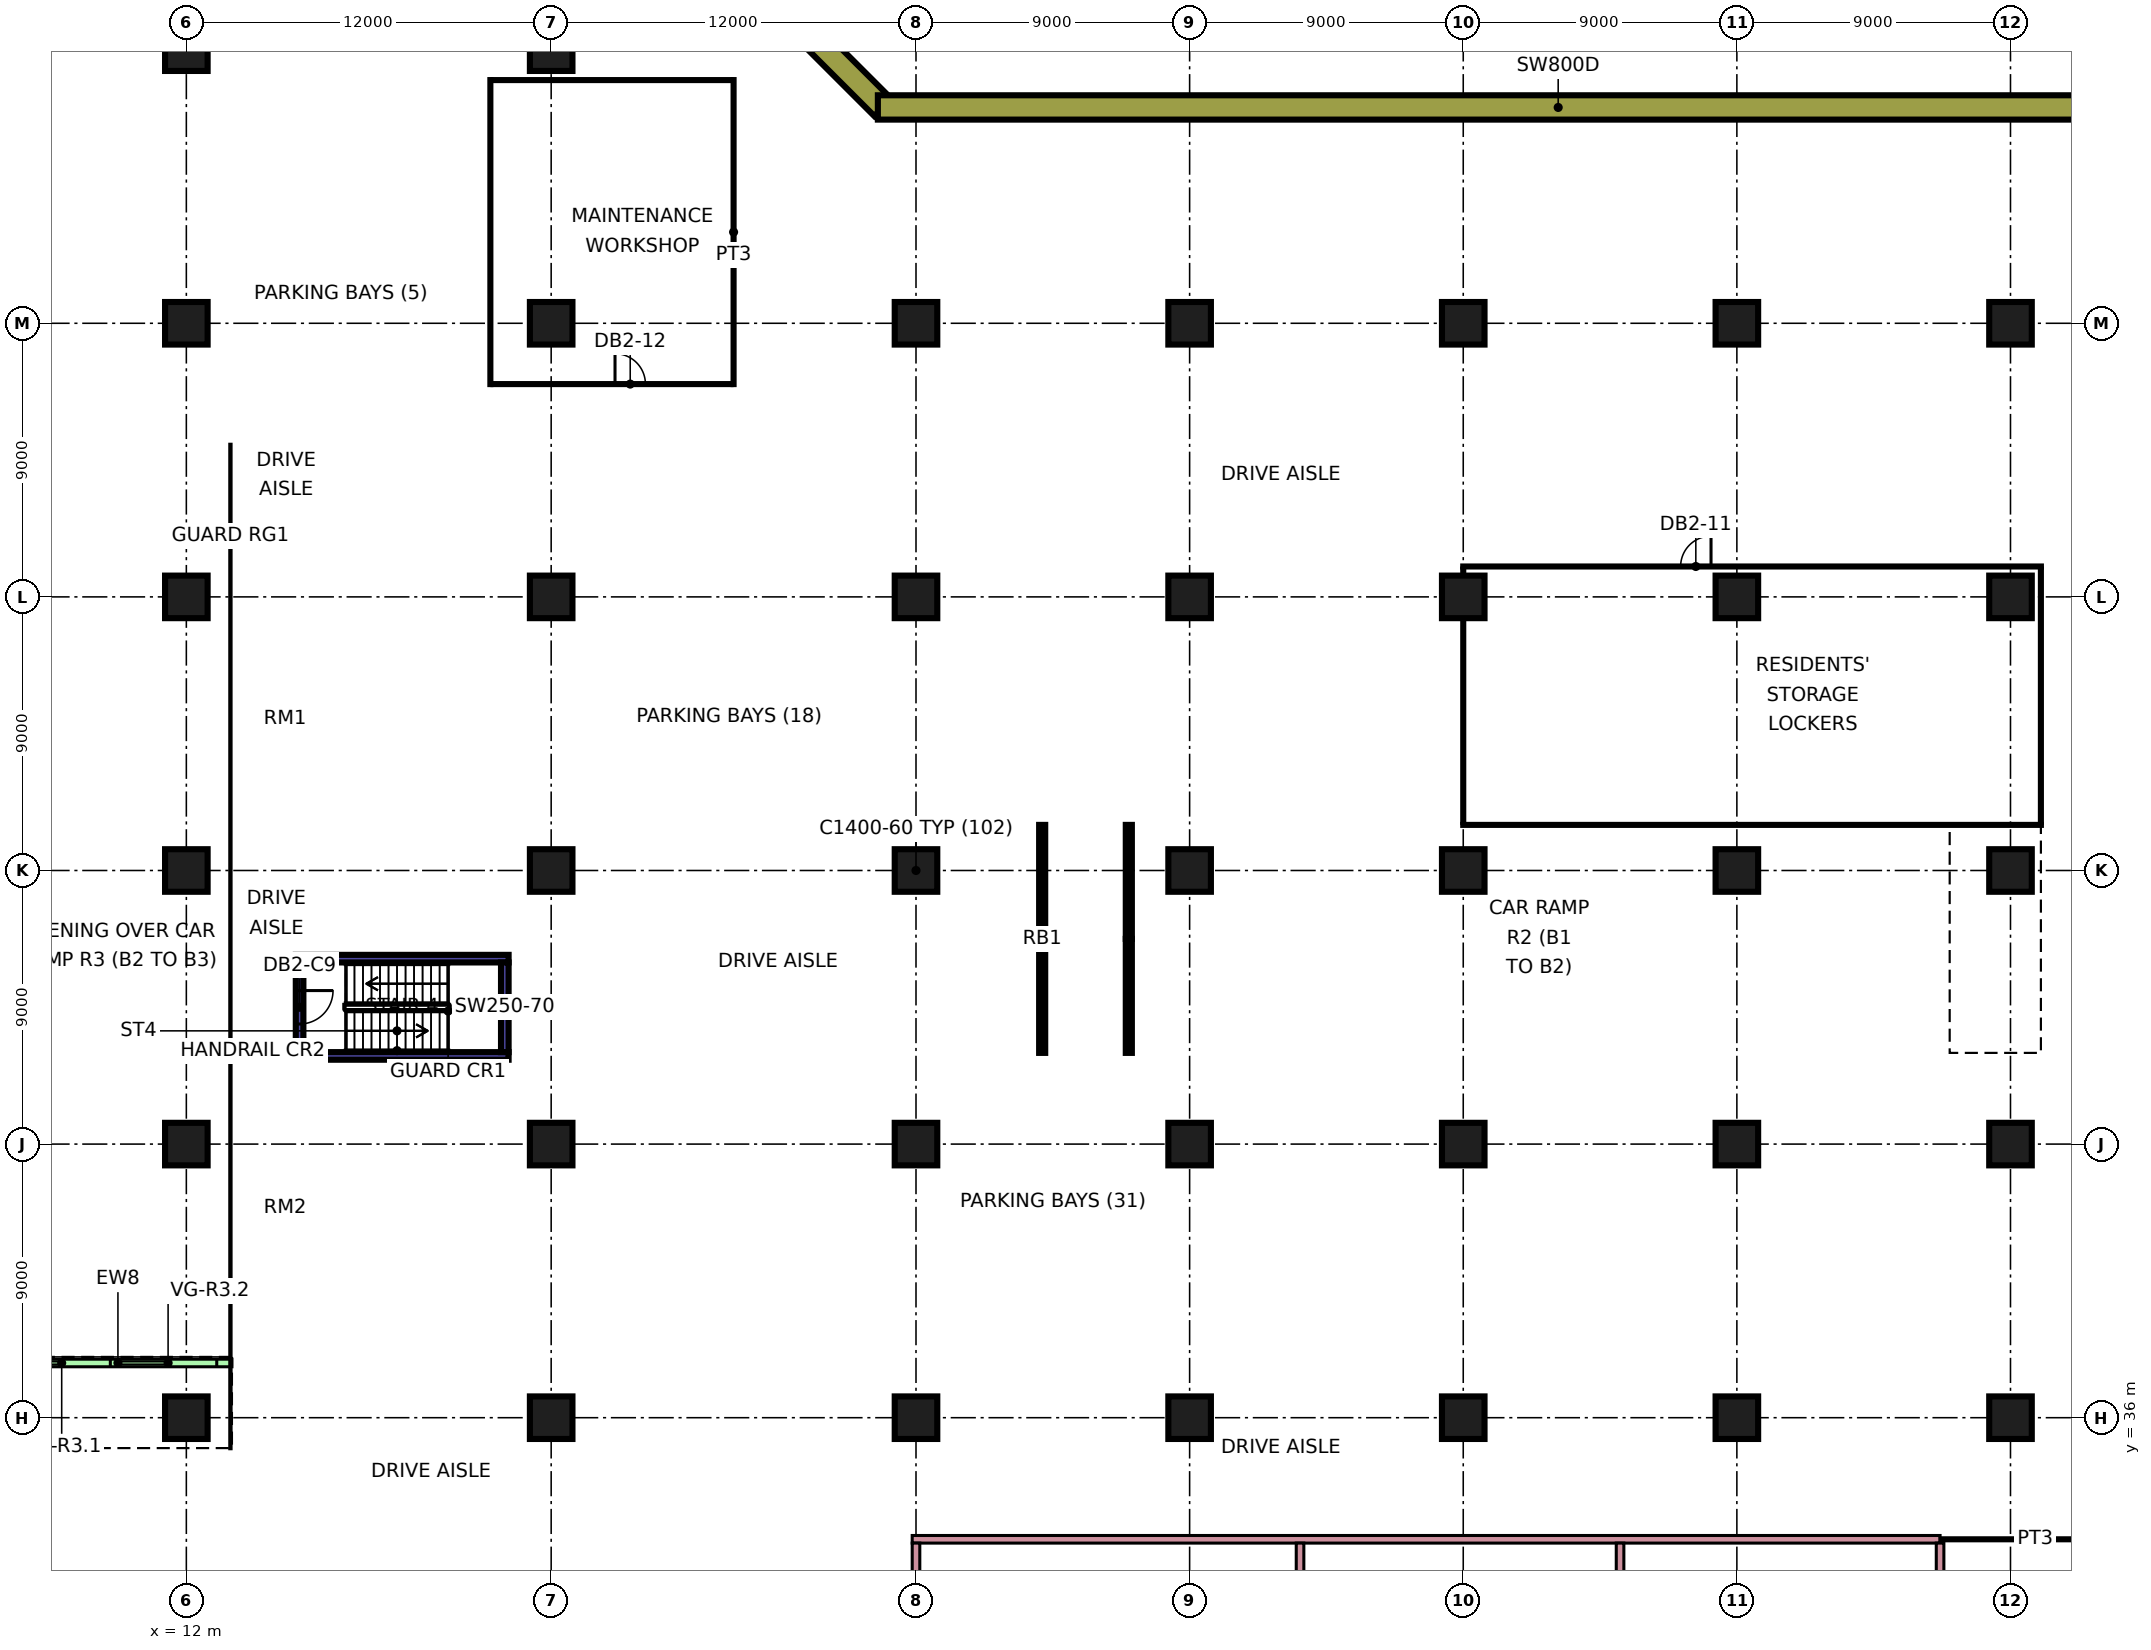
"""IFC4 building model, lengths in metres.
Left out: names, types, materials, properties, quantities, classifications, styles, units other than length and angle.
Written with IfcOpenShell. Run it as: python <this file> out.ifc"""

import sys

from ifc_helpers import new_model, si_unit, direction, frame, frame_2d, origin, origin_2d, place, context, subcontext, project, spatial, rectangle, extrude, element, fill, save


model = new_model("IFC4")
c1 = context("Model", 3, precision=1e-05, world=origin(), true_north=direction((0.0, 1.0)))
c2 = subcontext(c1, "Body", "Model", "MODEL_VIEW")
j1 = project(units=[si_unit("LENGTHUNIT", "METRE"), si_unit("PLANEANGLEUNIT", "RADIAN")], contexts=[c1])
p1 = place(None, origin())
s1 = spatial("IfcSite", under=j1, at=p1, CompositionType="ELEMENT")
p2 = place(p1, origin())
s2 = spatial("IfcBuilding", under=s1, at=p2, CompositionType="ELEMENT")
p3 = place(p2, frame((0.0, 0.0, -9.0)))
s3 = spatial("IfcBuildingStorey", under=s2, at=p3, CompositionType="ELEMENT", Elevation=-9.0)
for number, where, z_axis, x_axis in (
    (1, (12.0, 36.0, 0.0), (0.0, 0.0, 1.0), (1.0, 0.0, 0.0)),
    (2, (12.0, 45.0, 0.0), (0.0, 0.0, 1.0), (1.0, 0.0, 0.0)),
    (3, (12.0, 54.0, 0.0), (0.0, 0.0, 1.0), (1.0, 0.0, 0.0)),
    (4, (12.0, 63.0, 0.0), (0.0, 0.0, 1.0), (1.0, 0.0, 0.0)),
    (5, (12.0, 72.0, 0.0), (0.0, 0.0, 1.0), (1.0, 0.0, 0.0)),
    (6, (12.0, 81.0, 0.0), (0.0, 0.0, 1.0), (1.0, 0.0, 0.0)),
    (7, (24.0, 36.0, 0.0), (0.0, 0.0, 1.0), (1.0, 0.0, 0.0)),
    (8, (24.0, 45.0, 0.0), (0.0, 0.0, 1.0), (1.0, 0.0, 0.0)),
    (9, (24.0, 54.0, 0.0), (0.0, 0.0, 1.0), (1.0, 0.0, 0.0)),
    (10, (24.0, 63.0, 0.0), (0.0, 0.0, 1.0), (1.0, 0.0, 0.0)),
    (11, (24.0, 72.0, 0.0), (0.0, 0.0, 1.0), (1.0, 0.0, 0.0)),
    (12, (24.0, 81.0, 0.0), (0.0, 0.0, 1.0), (1.0, 0.0, 0.0)),
    (13, (36.0, 36.0, 0.0), (0.0, 0.0, 1.0), (1.0, 0.0, 0.0)),
    (14, (36.0, 45.0, 0.0), (0.0, 0.0, 1.0), (1.0, 0.0, 0.0)),
    (15, (36.0, 54.0, 0.0), (0.0, 0.0, 1.0), (1.0, 0.0, 0.0)),
    (16, (36.0, 63.0, 0.0), (0.0, 0.0, 1.0), (1.0, 0.0, 0.0)),
    (17, (36.0, 72.0, 0.0), (0.0, 0.0, 1.0), (1.0, 0.0, 0.0)),
    (18, (45.0, 36.0, 0.0), (0.0, 0.0, 1.0), (1.0, 0.0, 0.0)),
    (19, (45.0, 45.0, 0.0), (0.0, 0.0, 1.0), (1.0, 0.0, 0.0)),
    (20, (45.0, 54.0, 0.0), (0.0, 0.0, 1.0), (1.0, 0.0, 0.0)),
    (21, (45.0, 63.0, 0.0), (0.0, 0.0, 1.0), (1.0, 0.0, 0.0)),
    (22, (45.0, 72.0, 0.0), (0.0, 0.0, 1.0), (1.0, 0.0, 0.0)),
    (23, (54.0, 36.0, 0.0), (0.0, 0.0, 1.0), (1.0, 0.0, 0.0)),
    (24, (54.0, 45.0, 0.0), (0.0, 0.0, 1.0), (1.0, 0.0, 0.0)),
    (25, (54.0, 54.0, 0.0), (0.0, 0.0, 1.0), (1.0, 0.0, 0.0)),
    (26, (54.0, 63.0, 0.0), (0.0, 0.0, 1.0), (1.0, 0.0, 0.0)),
    (27, (54.0, 72.0, 0.0), (0.0, 0.0, 1.0), (1.0, 0.0, 0.0)),
    (28, (63.0, 36.0, 0.0), (0.0, 0.0, 1.0), (1.0, 0.0, 0.0)),
    (29, (63.0, 45.0, 0.0), (0.0, 0.0, 1.0), (1.0, 0.0, 0.0)),
    (30, (63.0, 54.0, 0.0), (0.0, 0.0, 1.0), (1.0, 0.0, 0.0)),
    (31, (63.0, 63.0, 0.0), (0.0, 0.0, 1.0), (1.0, 0.0, 0.0)),
    (32, (63.0, 72.0, 0.0), (0.0, 0.0, 1.0), (1.0, 0.0, 0.0)),
    (33, (72.0, 36.0, 0.0), (0.0, 0.0, 1.0), (1.0, 0.0, 0.0)),
    (34, (72.0, 45.0, 0.0), (0.0, 0.0, 1.0), (1.0, 0.0, 0.0)),
    (35, (72.0, 54.0, 0.0), (0.0, 0.0, 1.0), (1.0, 0.0, 0.0)),
    (36, (72.0, 63.0, 0.0), (0.0, 0.0, 1.0), (1.0, 0.0, 0.0)),
    (37, (72.0, 72.0, 0.0), (0.0, 0.0, 1.0), (1.0, 0.0, 0.0)),
):
    element("IfcColumn", number, at=place(p3, frame(where, z_axis=z_axis, x_axis=x_axis)), inside=s3, PredefinedType="COLUMN", context=c2, shape_type="SweptSolid", body=[
        extrude(rectangle(XDim=1.4, YDim=1.4, at=origin_2d()), origin(), (0.0, 0.0, 1.0), 4.5),
    ])
for number, where, z_axis, x_axis in (
    (38, (15.6, 47.9, 0.0), (0.0, 0.0, 1.0), (1.0, 0.0, 0.0)),
    (39, (15.6, 51.1, 0.0), (0.0, 0.0, 1.0), (1.0, 0.0, 0.0)),
):
    element("IfcWall", number, at=place(p3, frame(where, z_axis=z_axis, x_axis=x_axis)), inside=s3, PredefinedType="SHEAR", context=c2, shape_type="SweptSolid", body=[
        extrude(rectangle(XDim=7.0, YDim=0.25, at=frame_2d((3.5, 0.0))), origin(), (0.0, 0.0, 1.0), 4.5),
    ])
p4 = place(p3, frame((15.725, 48.025, 0.0), z_axis=(0.0, 0.0, 1.0), x_axis=(0.0, 1.0, 0.0)))
e40 = element("IfcWall", 40, at=p4, inside=s3, PredefinedType="SHEAR", context=c2, shape_type="SweptSolid", body=[
    extrude(rectangle(XDim=2.95, YDim=0.25, at=frame_2d((1.475, 0.0))), origin(), (0.0, 0.0, 1.0), 4.5),
])
p5 = place(p4, frame((0.925, 0.0, 0.0)))
e41 = element("IfcOpeningElement", 41, at=p5, cuts=e40, PredefinedType="OPENING", context=c2, shape_type="SweptSolid", body=[
    extrude(rectangle(XDim=1.1, YDim=2.2, at=frame_2d((0.55, 1.1))), frame((0.0, 0.135, 0.0), z_axis=(0.0, -1.0, 0.0), x_axis=(1.0, 0.0, 0.0)), (0.0, 0.0, 1.0), 0.27),
])
p6 = place(p3, frame((22.475, 48.025, 0.0), z_axis=(0.0, 0.0, 1.0), x_axis=(0.0, 1.0, 0.0)))
e42 = element("IfcWall", 42, at=p6, inside=s3, PredefinedType="SHEAR", context=c2, shape_type="SweptSolid", body=[
    extrude(rectangle(XDim=2.95, YDim=0.25, at=frame_2d((1.475, 0.0))), origin(), (0.0, 0.0, 1.0), 4.5),
])
p7 = place(p3, frame((34.912, 79.1, 0.0), z_axis=(0.0, 0.0, 1.0), x_axis=(-0.707106781187, 0.707106781187, 0.0)))
e43 = element("IfcWall", 43, at=p7, inside=s3, PredefinedType="SOLIDWALL", context=c2, shape_type="SweptSolid", body=[
    extrude(rectangle(XDim=6.364, YDim=0.8, at=frame_2d((3.182, 0.0))), origin(), (0.0, 0.0, 1.0), 4.5),
])
p8 = place(p3, frame((79.5, 79.1, 0.0), z_axis=(0.0, 0.0, 1.0), x_axis=(-1.0, 0.0, 0.0)))
e44 = element("IfcWall", 44, at=p8, inside=s3, PredefinedType="SOLIDWALL", context=c2, shape_type="SweptSolid", body=[
    extrude(rectangle(XDim=44.754, YDim=0.8, at=frame_2d((22.377, 0.0))), origin(), (0.0, 0.0, 1.0), 4.5),
])
for number, where, z_axis, x_axis in (
    (45, (43.0, 48.0, 0.0), (0.0, 0.0, 1.0), (0.0, 1.0, 0.0)),
    (46, (43.0, 51.75, 0.0), (0.0, 0.0, 1.0), (0.0, 1.0, 0.0)),
):
    element("IfcWall", number, at=place(p3, frame(where, z_axis=z_axis, x_axis=x_axis)), inside=s3, PredefinedType="SOLIDWALL", context=c2, shape_type="SweptSolid", body=[
        extrude(rectangle(XDim=3.75, YDim=0.2, at=frame_2d((1.875, 0.0))), origin(), (0.0, 0.0, 1.0), 3.95),
    ])
p9 = place(p3, frame((40.15, 48.0, 0.0), z_axis=(0.0, 0.0, 1.0), x_axis=(0.0, 1.0, 0.0)))
e47 = element("IfcWall", 47, at=p9, inside=s3, PredefinedType="SOLIDWALL", context=c2, shape_type="SweptSolid", body=[
    extrude(rectangle(XDim=7.5, YDim=0.2, at=frame_2d((3.75, 0.0))), origin(), (0.0, 0.0, 1.0), 4.188),
])
p10 = place(p3, frame((6.0, 37.8, -0.233), z_axis=(0.0, 0.0, 1.0), x_axis=(1.0, 0.0, 0.0)))
e48 = element("IfcWall", 48, at=p10, inside=s3, PredefinedType="SOLIDWALL", context=c2, shape_type="SweptSolid", body=[
    extrude(rectangle(XDim=7.5, YDim=0.25, at=frame_2d((3.75, 0.0))), origin(), (0.0, 0.0, 1.0), 2.7),
])
p11 = place(p10, frame((0.3, 0.0, 0.0)))
e49 = element("IfcOpeningElement", 49, at=p11, cuts=e48, PredefinedType="OPENING", context=c2, shape_type="SweptSolid", body=[
    extrude(rectangle(XDim=3.2, YDim=2.4, at=frame_2d((1.6, 1.2))), frame((0.0, 0.135, 0.0), z_axis=(0.0, -1.0, 0.0), x_axis=(1.0, 0.0, 0.0)), (0.0, 0.0, 1.0), 0.27),
])
p12 = place(p10, frame((3.8, 0.0, 0.0)))
e50 = element("IfcOpeningElement", 50, at=p12, cuts=e48, PredefinedType="OPENING", context=c2, shape_type="SweptSolid", body=[
    extrude(rectangle(XDim=3.2, YDim=2.4, at=frame_2d((1.6, 1.2))), frame((0.0, 0.135, 0.0), z_axis=(0.0, -1.0, 0.0), x_axis=(1.0, 0.0, 0.0)), (0.0, 0.0, 1.0), 0.27),
])
p13 = place(p3, frame((22.0, 69.95, 0.0), z_axis=(0.0, 0.0, 1.0), x_axis=(0.0, 1.0, 0.0)))
e51 = element("IfcWall", 51, at=p13, inside=s3, PredefinedType="PARTITIONING", context=c2, shape_type="SweptSolid", body=[
    extrude(rectangle(XDim=10.1, YDim=0.1, at=frame_2d((5.05, 0.0))), origin(), (0.0, 0.0, 1.0), 4.05),
])
p14 = place(p3, frame((22.05, 70.0, 0.0), z_axis=(0.0, 0.0, 1.0), x_axis=(1.0, 0.0, 0.0)))
e52 = element("IfcWall", 52, at=p14, inside=s3, PredefinedType="PARTITIONING", context=c2, shape_type="SweptSolid", body=[
    extrude(rectangle(XDim=7.9, YDim=0.1, at=frame_2d((3.95, 0.0))), origin(), (0.0, 0.0, 1.0), 4.05),
])
p15 = place(p14, frame((4.05, 0.0, 0.0)))
e53 = element("IfcOpeningElement", 53, at=p15, cuts=e52, PredefinedType="OPENING", context=c2, shape_type="SweptSolid", body=[
    extrude(rectangle(XDim=1.0, YDim=2.1, at=frame_2d((0.5, 1.05))), frame((0.0, 0.06, 0.0), z_axis=(0.0, -1.0, 0.0), x_axis=(1.0, 0.0, 0.0)), (0.0, 0.0, 1.0), 0.12),
])
p16 = place(p3, frame((22.05, 80.0, 0.0), z_axis=(0.0, 0.0, 1.0), x_axis=(1.0, 0.0, 0.0)))
e54 = element("IfcWall", 54, at=p16, inside=s3, PredefinedType="PARTITIONING", context=c2, shape_type="SweptSolid", body=[
    extrude(rectangle(XDim=7.9, YDim=0.1, at=frame_2d((3.95, 0.0))), origin(), (0.0, 0.0, 1.0), 4.05),
])
p17 = place(p3, frame((30.0, 69.95, 0.0), z_axis=(0.0, 0.0, 1.0), x_axis=(0.0, 1.0, 0.0)))
e55 = element("IfcWall", 55, at=p17, inside=s3, PredefinedType="PARTITIONING", context=c2, shape_type="SweptSolid", body=[
    extrude(rectangle(XDim=10.1, YDim=0.1, at=frame_2d((5.05, 0.0))), origin(), (0.0, 0.0, 1.0), 4.05),
])
p18 = place(p3, frame((35.875, 32.0, 0.0), z_axis=(0.0, 0.0, 1.0), x_axis=(1.0, 0.0, 0.0)))
e56 = element("IfcWall", 56, at=p18, inside=s3, PredefinedType="PARTITIONING", context=c2, shape_type="SweptSolid", body=[
    extrude(rectangle(XDim=33.809, YDim=0.25, at=frame_2d((16.905, 0.0))), origin(), (0.0, 0.0, 1.0), 4.05),
])
p19 = place(p3, frame((36.0, 24.699, 0.0), z_axis=(0.0, 0.0, 1.0), x_axis=(0.0, 1.0, 0.0)))
e57 = element("IfcWall", 57, at=p19, inside=s3, PredefinedType="PARTITIONING", context=c2, shape_type="SweptSolid", body=[
    extrude(rectangle(XDim=7.176, YDim=0.25, at=frame_2d((3.588, 0.0))), origin(), (0.0, 0.0, 1.0), 4.05),
])
p20 = place(p3, frame((48.632, 22.6, 0.0), z_axis=(0.0, 0.0, 1.0), x_axis=(0.0, 1.0, 0.0)))
e58 = element("IfcWall", 58, at=p20, inside=s3, PredefinedType="PARTITIONING", context=c2, shape_type="SweptSolid", body=[
    extrude(rectangle(XDim=9.275, YDim=0.25, at=frame_2d((4.637, 0.0))), origin(), (0.0, 0.0, 1.0), 4.05),
])
p21 = place(p3, frame((53.95, 55.5, 0.0), z_axis=(0.0, 0.0, 1.0), x_axis=(1.0, 0.0, 0.0)))
e59 = element("IfcWall", 59, at=p21, inside=s3, PredefinedType="PARTITIONING", context=c2, shape_type="SweptSolid", body=[
    extrude(rectangle(XDim=19.1, YDim=0.1, at=frame_2d((9.55, 0.0))), origin(), (0.0, 0.0, 1.0), 4.05),
])
p22 = place(p3, frame((53.95, 64.0, 0.0), z_axis=(0.0, 0.0, 1.0), x_axis=(1.0, 0.0, 0.0)))
e60 = element("IfcWall", 60, at=p22, inside=s3, PredefinedType="PARTITIONING", context=c2, shape_type="SweptSolid", body=[
    extrude(rectangle(XDim=19.1, YDim=0.1, at=frame_2d((9.55, 0.0))), origin(), (0.0, 0.0, 1.0), 4.05),
])
p23 = place(p22, frame((7.2, 0.0, 0.0)))
e61 = element("IfcOpeningElement", 61, at=p23, cuts=e60, PredefinedType="OPENING", context=c2, shape_type="SweptSolid", body=[
    extrude(rectangle(XDim=1.0, YDim=2.1, at=frame_2d((0.5, 1.05))), frame((0.0, 0.06, 0.0), z_axis=(0.0, -1.0, 0.0), x_axis=(1.0, 0.0, 0.0)), (0.0, 0.0, 1.0), 0.12),
])
p24 = place(p3, frame((54.0, 55.55, 0.0), z_axis=(0.0, 0.0, 1.0), x_axis=(0.0, 1.0, 0.0)))
e62 = element("IfcWall", 62, at=p24, inside=s3, PredefinedType="PARTITIONING", context=c2, shape_type="SweptSolid", body=[
    extrude(rectangle(XDim=6.751, YDim=0.1, at=frame_2d((3.375, 0.0))), origin(), (0.0, 0.0, 1.0), 4.05),
])
p25 = place(p3, frame((54.0, 63.699, 0.0), z_axis=(0.0, 0.0, 1.0), x_axis=(0.0, 1.0, 0.0)))
e63 = element("IfcWall", 63, at=p25, inside=s3, PredefinedType="PARTITIONING", context=c2, shape_type="SweptSolid", body=[
    extrude(rectangle(XDim=0.251, YDim=0.1, at=frame_2d((0.125, 0.0))), origin(), (0.0, 0.0, 1.0), 4.05),
])
for number, where, z_axis, x_axis in (
    (64, (59.158, 21.325, 0.0), (0.0, 0.0, 1.0), (0.0, 1.0, 0.0)),
    (65, (69.684, 21.325, 0.0), (0.0, 0.0, 1.0), (0.0, 1.0, 0.0)),
):
    element("IfcWall", number, at=place(p3, frame(where, z_axis=z_axis, x_axis=x_axis)), inside=s3, PredefinedType="PARTITIONING", context=c2, shape_type="SweptSolid", body=[
        extrude(rectangle(XDim=10.55, YDim=0.25, at=frame_2d((5.275, 0.0))), origin(), (0.0, 0.0, 1.0), 4.05),
    ])
p26 = place(p3, frame((69.684, 32.0, 0.0), z_axis=(0.0, 0.0, 1.0), x_axis=(1.0, 0.0, 0.0)))
e66 = element("IfcWall", 66, at=p26, inside=s3, PredefinedType="PARTITIONING", context=c2, shape_type="SweptSolid", body=[
    extrude(rectangle(XDim=6.266, YDim=0.1, at=frame_2d((3.133, 0.0))), origin(), (0.0, 0.0, 1.0), 4.05),
])
p27 = place(p3, frame((73.0, 55.55, 0.0), z_axis=(0.0, 0.0, 1.0), x_axis=(0.0, 1.0, 0.0)))
e67 = element("IfcWall", 67, at=p27, inside=s3, PredefinedType="PARTITIONING", context=c2, shape_type="SweptSolid", body=[
    extrude(rectangle(XDim=8.4, YDim=0.1, at=frame_2d((4.2, 0.0))), origin(), (0.0, 0.0, 1.0), 4.05),
])
p28 = place(p5, origin())
e68 = element("IfcDoor", 68, at=p28, inside=s3, OperationType="SINGLE_SWING_RIGHT", PredefinedType="DOOR", context=c2, shape_type="SweptSolid", body=[
    extrude(rectangle(XDim=1.1, YDim=2.2, at=frame_2d((0.55, 1.1))), frame((0.0, 0.025, 0.0), z_axis=(0.0, -1.0, 0.0), x_axis=(1.0, 0.0, 0.0)), (0.0, 0.0, 1.0), 0.05),
])
fill(e41, e68)
p29 = place(p11, origin())
e69 = element("IfcDoor", 69, at=p29, inside=s3, OperationType="SLIDING_TO_LEFT", PredefinedType="GATE", context=c2, shape_type="SweptSolid", body=[
    extrude(rectangle(XDim=3.2, YDim=2.4, at=frame_2d((1.6, 1.2))), frame((0.0, 0.025, 0.0), z_axis=(0.0, -1.0, 0.0), x_axis=(1.0, 0.0, 0.0)), (0.0, 0.0, 1.0), 0.05),
])
fill(e49, e69)
p30 = place(p12, origin())
e70 = element("IfcDoor", 70, at=p30, inside=s3, OperationType="SLIDING_TO_LEFT", PredefinedType="GATE", context=c2, shape_type="SweptSolid", body=[
    extrude(rectangle(XDim=3.2, YDim=2.4, at=frame_2d((1.6, 1.2))), frame((0.0, 0.025, 0.0), z_axis=(0.0, -1.0, 0.0), x_axis=(1.0, 0.0, 0.0)), (0.0, 0.0, 1.0), 0.05),
])
fill(e50, e70)
p31 = place(p23, frame((1.0, 0.0, 0.0), z_axis=(0.0, 0.0, 1.0), x_axis=(-1.0, 0.0, 0.0)))
e71 = element("IfcDoor", 71, at=p31, inside=s3, OperationType="SINGLE_SWING_RIGHT", PredefinedType="DOOR", context=c2, shape_type="SweptSolid", body=[
    extrude(rectangle(XDim=1.0, YDim=2.1, at=frame_2d((0.5, 1.05))), frame((0.0, 0.025, 0.0), z_axis=(0.0, -1.0, 0.0), x_axis=(1.0, 0.0, 0.0)), (0.0, 0.0, 1.0), 0.05),
])
fill(e61, e71)
p32 = place(p15, origin())
e72 = element("IfcDoor", 72, at=p32, inside=s3, OperationType="SINGLE_SWING_LEFT", PredefinedType="DOOR", context=c2, shape_type="SweptSolid", body=[
    extrude(rectangle(XDim=1.0, YDim=2.1, at=frame_2d((0.5, 1.05))), frame((0.0, 0.025, 0.0), z_axis=(0.0, -1.0, 0.0), x_axis=(1.0, 0.0, 0.0)), (0.0, 0.0, 1.0), 0.05),
])
fill(e53, e72)
save(model, sys.argv[1])
